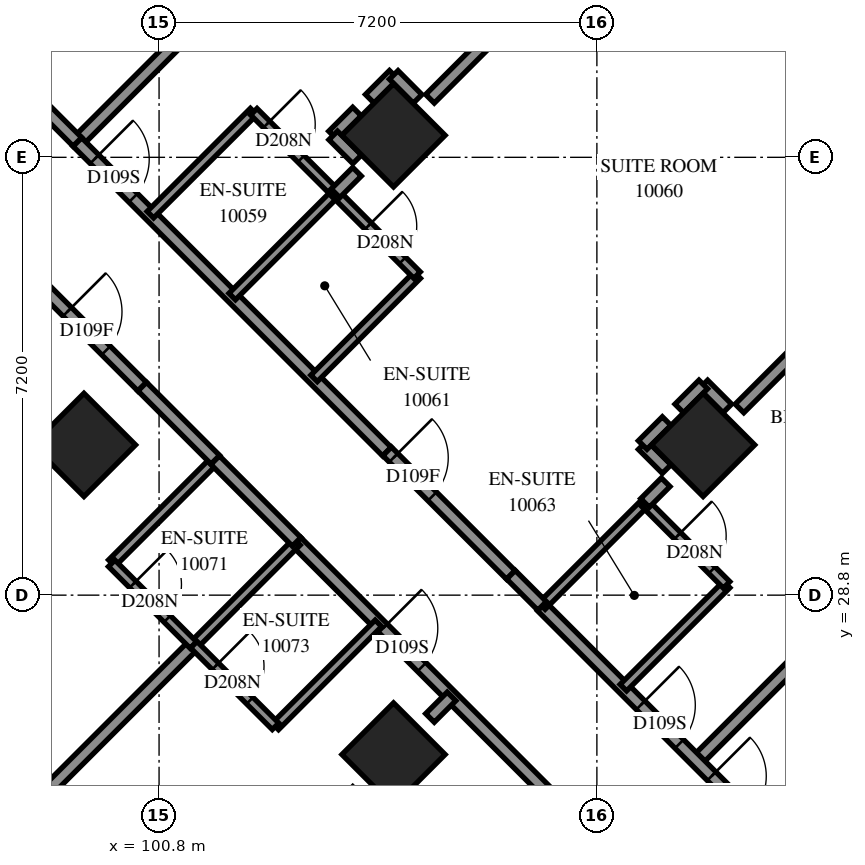
"""IFC4 building model, lengths in metres.
Left out: names, types, materials, properties, quantities, classifications, styles, units other than length and angle.
Written with IfcOpenShell. Run it as: python <this file> out.ifc"""

import sys

from ifc_helpers import new_model, si_unit, direction, frame, frame_2d, origin, origin_2d, place, context, subcontext, project, spatial, rectangle, extrude, element, fill, save


model = new_model("IFC4")
c1 = context("Model", 3, precision=1e-05, world=origin(), true_north=direction((0.0, 1.0)))
c2 = subcontext(c1, "Body", "Model", "MODEL_VIEW")
j1 = project(units=[si_unit("LENGTHUNIT", "METRE"), si_unit("PLANEANGLEUNIT", "RADIAN")], contexts=[c1])
p1 = place(None, origin())
s1 = spatial("IfcSite", under=j1, at=p1, CompositionType="ELEMENT")
p2 = place(p1, origin())
s2 = spatial("IfcBuilding", under=s1, at=p2, CompositionType="ELEMENT")
p3 = place(p2, frame((0.0, 0.0, 40.6)))
s3 = spatial("IfcBuildingStorey", under=s2, at=p3, CompositionType="ELEMENT", Elevation=40.6)
for number, where, z_axis, x_axis in (
    (1, (104.656, 36.362, 0.0), (0.0, 0.0, 1.0), (0.707, -0.707, 0.0)),
    (2, (99.565, 31.271, 0.0), (0.0, 0.0, 1.0), (0.707, -0.707, 0.0)),
    (3, (109.747, 31.271, 0.0), (0.0, 0.0, 1.0), (0.707, -0.707, 0.0)),
    (4, (104.656, 26.18, 0.0), (0.0, 0.0, 1.0), (0.707, -0.707, 0.0)),
):
    element("IfcColumn", number, at=place(p3, frame(where, z_axis=z_axis, x_axis=x_axis)), inside=s3, PredefinedType="COLUMN", context=c2, shape_type="SweptSolid", body=[
        extrude(rectangle(XDim=1.2, YDim=1.2, at=origin_2d()), origin(), (0.0, 0.0, 1.0), 3.1),
    ])
p4 = place(p3, frame((99.459, 36.255, 0.0), z_axis=(0.0, 0.0, 1.0), x_axis=(0.7071905616, 0.7070229908, 0.0)))
e5 = element("IfcWall", 5, at=p4, inside=s3, PredefinedType="PARTITIONING", context=c2, shape_type="SweptSolid", body=[
    extrude(rectangle(XDim=11.935, YDim=0.2, at=frame_2d((5.968, 0.0))), origin(), (0.0, 0.0, 1.0), 3.1),
])
p5 = place(p3, frame((103.061, 29.677, 0.0), z_axis=(0.0, 0.0, 1.0), x_axis=(0.7071067812, -0.7071067812, 0.0)))
e6 = element("IfcWall", 6, at=p5, inside=s3, PredefinedType="PARTITIONING", context=c2, shape_type="SweptSolid", body=[
    extrude(rectangle(XDim=10.802, YDim=0.2, at=frame_2d((5.401, 0.0))), origin(), (0.0, 0.0, 1.0), 3.1),
])
p6 = place(p5, frame((2.012, 0.0, 0.0)))
e7 = element("IfcOpeningElement", 7, at=p6, cuts=e6, PredefinedType="OPENING", context=c2, shape_type="SweptSolid", body=[
    extrude(rectangle(XDim=0.9, YDim=2.1, at=frame_2d((0.45, 1.05))), frame((0.0, 0.11, 0.0), z_axis=(0.0, -1.0, 0.0), x_axis=(1.0, 0.0, 0.0)), (0.0, 0.0, 1.0), 0.22),
])
p7 = place(p5, frame((7.463, 0.0, 0.0)))
e8 = element("IfcOpeningElement", 8, at=p7, cuts=e6, PredefinedType="OPENING", context=c2, shape_type="SweptSolid", body=[
    extrude(rectangle(XDim=1.0, YDim=2.1, at=frame_2d((0.5, 1.05))), frame((0.0, 0.11, 0.0), z_axis=(0.0, -1.0, 0.0), x_axis=(1.0, 0.0, 0.0)), (0.0, 0.0, 1.0), 0.22),
])
p8 = place(p3, frame((99.455, 36.253, 0.0), z_axis=(0.0, 0.0, 1.0), x_axis=(0.7071067812, -0.7071067812, 0.0)))
e9 = element("IfcWall", 9, at=p8, inside=s3, PredefinedType="PARTITIONING", context=c2, shape_type="SweptSolid", body=[
    extrude(rectangle(XDim=7.201, YDim=0.2, at=frame_2d((3.601, 0.0))), origin(), (0.0, 0.0, 1.0), 3.1),
])
p9 = place(p8, frame((0.401, 0.0, 0.0)))
e10 = element("IfcOpeningElement", 10, at=p9, cuts=e9, PredefinedType="OPENING", context=c2, shape_type="SweptSolid", body=[
    extrude(rectangle(XDim=0.9, YDim=2.1, at=frame_2d((0.45, 1.05))), frame((0.0, 0.11, 0.0), z_axis=(0.0, -1.0, 0.0), x_axis=(1.0, 0.0, 0.0)), (0.0, 0.0, 1.0), 0.22),
])
p10 = place(p3, frame((96.532, 23.148, 0.0), z_axis=(0.0, 0.0, 1.0), x_axis=(0.7071140939, 0.7070994684, 0.0)))
e11 = element("IfcWall", 11, at=p10, inside=s3, PredefinedType="PARTITIONING", context=c2, shape_type="SweptSolid", body=[
    extrude(rectangle(XDim=6.837, YDim=0.2, at=frame_2d((3.419, 0.0))), origin(), (0.0, 0.0, 1.0), 3.1),
])
p11 = place(p3, frame((109.64, 26.074, 0.0), z_axis=(0.0, 0.0, 1.0), x_axis=(0.7072538194, 0.7069597124, 0.0)))
e12 = element("IfcWall", 12, at=p11, inside=s3, PredefinedType="PARTITIONING", context=c2, shape_type="SweptSolid", body=[
    extrude(rectangle(XDim=6.8, YDim=0.2, at=frame_2d((3.4, 0.0))), origin(), (0.0, 0.0, 1.0), 3.1),
])
for number, where, z_axis, x_axis in (
    (13, (110.345, 31.871, 0.0), (0.0, 0.0, 1.0), (0.707, 0.707, 0.0)),
    (14, (105.255, 36.963, 0.0), (0.0, 0.0, 1.0), (0.707, 0.707, 0.0)),
):
    element("IfcWall", number, at=place(p3, frame(where, z_axis=z_axis, x_axis=x_axis)), inside=s3, PredefinedType="PARTITIONING", context=c2, shape_type="SweptSolid", body=[
        extrude(rectangle(XDim=5.504, YDim=0.2, at=frame_2d((2.752, 0.0))), origin(), (0.0, 0.0, 1.0), 3.1),
    ])
p12 = place(p3, frame((107.093, 28.615, 0.0), z_axis=(0.0, 0.0, 1.0), x_axis=(0.7072011313, -0.7070124185, 0.0)))
e15 = element("IfcWall", 15, at=p12, inside=s3, PredefinedType="PARTITIONING", context=c2, shape_type="SweptSolid", body=[
    extrude(rectangle(XDim=5.299, YDim=0.2, at=frame_2d((2.65, 0.0))), origin(), (0.0, 0.0, 1.0), 3.1),
])
p13 = place(p12, frame((2.299, 0.0, 0.0)))
e16 = element("IfcOpeningElement", 16, at=p13, cuts=e15, PredefinedType="OPENING", context=c2, shape_type="SweptSolid", body=[
    extrude(rectangle(XDim=0.9, YDim=2.1, at=frame_2d((0.45, 1.05))), frame((0.0, 0.11, 0.0), z_axis=(0.0, -1.0, 0.0), x_axis=(1.0, 0.0, 0.0)), (0.0, 0.0, 1.0), 0.22),
])
p14 = place(p12, frame((3.949, 0.0, 0.0)))
e17 = element("IfcOpeningElement", 17, at=p14, cuts=e15, PredefinedType="OPENING", context=c2, shape_type="SweptSolid", body=[
    extrude(rectangle(XDim=0.9, YDim=2.1, at=frame_2d((0.45, 1.05))), frame((0.0, 0.11, 0.0), z_axis=(0.0, -1.0, 0.0), x_axis=(1.0, 0.0, 0.0)), (0.0, 0.0, 1.0), 0.22),
])
p15 = place(p3, frame((96.913, 38.801, 0.0), z_axis=(0.0, 0.0, 1.0), x_axis=(0.7068288851, -0.7073845681, 0.0)))
e18 = element("IfcWall", 18, at=p15, inside=s3, PredefinedType="PARTITIONING", context=c2, shape_type="SweptSolid", body=[
    extrude(rectangle(XDim=3.599, YDim=0.2, at=frame_2d((1.8, 0.0))), origin(), (0.0, 0.0, 1.0), 3.1),
])
p16 = place(p3, frame((97.976, 34.772, 0.0), z_axis=(0.0, 0.0, 1.0), x_axis=(0.7073845681, -0.7068288851, 0.0)))
e19 = element("IfcWall", 19, at=p16, inside=s3, PredefinedType="PARTITIONING", context=c2, shape_type="SweptSolid", body=[
    extrude(rectangle(XDim=3.599, YDim=0.2, at=frame_2d((1.8, 0.0))), origin(), (0.0, 0.0, 1.0), 3.1),
])
p17 = place(p16, frame((1.858, 0.0, 0.0)))
e20 = element("IfcOpeningElement", 20, at=p17, cuts=e19, PredefinedType="OPENING", context=c2, shape_type="SweptSolid", body=[
    extrude(rectangle(XDim=0.9, YDim=2.1, at=frame_2d((0.45, 1.05))), frame((0.0, 0.11, 0.0), z_axis=(0.0, -1.0, 0.0), x_axis=(1.0, 0.0, 0.0)), (0.0, 0.0, 1.0), 0.22),
])
p18 = place(p3, frame((104.551, 31.165, 0.0), z_axis=(0.0, 0.0, 1.0), x_axis=(0.7074545101, -0.7067588812, 0.0)))
e21 = element("IfcWall", 21, at=p18, inside=s3, PredefinedType="PARTITIONING", context=c2, shape_type="SweptSolid", body=[
    extrude(rectangle(XDim=2.875, YDim=0.2, at=frame_2d((1.438, 0.0))), origin(), (0.0, 0.0, 1.0), 3.1),
])
p19 = place(p18, frame((0.148, 0.0, 0.0)))
e22 = element("IfcOpeningElement", 22, at=p19, cuts=e21, PredefinedType="OPENING", context=c2, shape_type="SweptSolid", body=[
    extrude(rectangle(XDim=0.9, YDim=2.1, at=frame_2d((0.45, 1.05))), frame((0.0, 0.11, 0.0), z_axis=(0.0, -1.0, 0.0), x_axis=(1.0, 0.0, 0.0)), (0.0, 0.0, 1.0), 0.22),
])
for number, where, z_axis, x_axis in (
    (23, (102.003, 33.711, 0.0), (0.0, 0.0, 1.0), (0.707, 0.707, 0.0)),
    (24, (100.023, 29.327, 0.0), (0.0, 0.0, 1.0), (0.707, 0.707, 0.0)),
):
    element("IfcWall", number, at=place(p3, frame(where, z_axis=z_axis, x_axis=x_axis)), inside=s3, PredefinedType="PARTITIONING", context=c2, shape_type="SweptSolid", body=[
        extrude(rectangle(XDim=2.401, YDim=0.15, at=frame_2d((1.201, 0.0))), origin(), (0.0, 0.0, 1.0), 3.1),
    ])
for number, where, z_axis, x_axis in (
    (25, (100.657, 35.057, 0.0), (0.0, 0.0, 1.0), (0.708, 0.707, 0.0)),
    (26, (101.371, 27.979, 0.0), (0.0, 0.0, 1.0), (0.707, 0.708, 0.0)),
    (27, (108.435, 27.279, 0.0), (0.0, 0.0, 1.0), (0.708, 0.707, 0.0)),
    (28, (103.349, 32.365, 0.0), (0.0, 0.0, 1.0), (0.707, 0.708, 0.0)),
):
    element("IfcWall", number, at=place(p3, frame(where, z_axis=z_axis, x_axis=x_axis)), inside=s3, PredefinedType="PARTITIONING", context=c2, shape_type="SweptSolid", body=[
        extrude(rectangle(XDim=2.4, YDim=0.15, at=frame_2d((1.2, 0.0))), origin(), (0.0, 0.0, 1.0), 3.1),
    ])
for number, where, z_axis, x_axis in (
    (29, (102.711, 26.641, 0.0), (0.0, 0.0, 1.0), (0.707, 0.707, 0.0)),
    (30, (107.095, 28.621, 0.0), (0.0, 0.0, 1.0), (0.707, 0.707, 0.0)),
    (31, (110.843, 24.873, 0.0), (0.0, 0.0, 1.0), (0.707, 0.707, 0.0)),
):
    element("IfcWall", number, at=place(p3, frame(where, z_axis=z_axis, x_axis=x_axis)), inside=s3, PredefinedType="PARTITIONING", context=c2, shape_type="SweptSolid", body=[
        extrude(rectangle(XDim=2.398, YDim=0.15, at=frame_2d((1.199, 0.0))), origin(), (0.0, 0.0, 1.0), 3.1),
    ])
p20 = place(p3, frame((100.021, 29.323, 0.0), z_axis=(0.0, 0.0, 1.0), x_axis=(0.7071067812, -0.7071067812, 0.0)))
e32 = element("IfcWall", 32, at=p20, inside=s3, PredefinedType="PARTITIONING", context=c2, shape_type="SweptSolid", body=[
    extrude(rectangle(XDim=1.901, YDim=0.15, at=frame_2d((0.95, 0.0))), origin(), (0.0, 0.0, 1.0), 3.1),
])
p21 = place(p20, frame((0.491, 0.0, 0.0)))
e33 = element("IfcOpeningElement", 33, at=p21, cuts=e32, PredefinedType="OPENING", context=c2, shape_type="SweptSolid", body=[
    extrude(rectangle(XDim=0.8, YDim=2.1, at=frame_2d((0.4, 1.05))), frame((0.0, 0.085, 0.0), z_axis=(0.0, -1.0, 0.0), x_axis=(1.0, 0.0, 0.0)), (0.0, 0.0, 1.0), 0.17),
])
p22 = place(p3, frame((108.789, 30.313, 0.0), z_axis=(0.0, 0.0, 1.0), x_axis=(0.7071067812, -0.7071067812, 0.0)))
e34 = element("IfcWall", 34, at=p22, inside=s3, PredefinedType="PARTITIONING", context=c2, shape_type="SweptSolid", body=[
    extrude(rectangle(XDim=1.901, YDim=0.15, at=frame_2d((0.95, 0.0))), origin(), (0.0, 0.0, 1.0), 3.1),
])
p23 = place(p22, frame((0.76, 0.0, 0.0)))
e35 = element("IfcOpeningElement", 35, at=p23, cuts=e34, PredefinedType="OPENING", context=c2, shape_type="SweptSolid", body=[
    extrude(rectangle(XDim=0.8, YDim=2.1, at=frame_2d((0.4, 1.05))), frame((0.0, 0.085, 0.0), z_axis=(0.0, -1.0, 0.0), x_axis=(1.0, 0.0, 0.0)), (0.0, 0.0, 1.0), 0.17),
])
p24 = place(p3, frame((101.371, 27.985, 0.0), z_axis=(0.0, 0.0, 1.0), x_axis=(0.7076330979, -0.7065800724, 0.0)))
e36 = element("IfcWall", 36, at=p24, inside=s3, PredefinedType="PARTITIONING", context=c2, shape_type="SweptSolid", body=[
    extrude(rectangle(XDim=1.899, YDim=0.15, at=frame_2d((0.95, 0.0))), origin(), (0.0, 0.0, 1.0), 3.1),
])
p25 = place(p24, frame((0.501, 0.0, 0.0)))
e37 = element("IfcOpeningElement", 37, at=p25, cuts=e36, PredefinedType="OPENING", context=c2, shape_type="SweptSolid", body=[
    extrude(rectangle(XDim=0.8, YDim=2.1, at=frame_2d((0.4, 1.05))), frame((0.0, 0.085, 0.0), z_axis=(0.0, -1.0, 0.0), x_axis=(1.0, 0.0, 0.0)), (0.0, 0.0, 1.0), 0.17),
])
p26 = place(p3, frame((103.701, 35.407, 0.0), z_axis=(0.0, 0.0, 1.0), x_axis=(0.7065800724, -0.7076330979, 0.0)))
e38 = element("IfcWall", 38, at=p26, inside=s3, PredefinedType="PARTITIONING", context=c2, shape_type="SweptSolid", body=[
    extrude(rectangle(XDim=1.899, YDim=0.15, at=frame_2d((0.95, 0.0))), origin(), (0.0, 0.0, 1.0), 3.1),
])
p27 = place(p26, frame((0.759, 0.0, 0.0)))
e39 = element("IfcOpeningElement", 39, at=p27, cuts=e38, PredefinedType="OPENING", context=c2, shape_type="SweptSolid", body=[
    extrude(rectangle(XDim=0.8, YDim=2.1, at=frame_2d((0.4, 1.05))), frame((0.0, 0.085, 0.0), z_axis=(0.0, -1.0, 0.0), x_axis=(1.0, 0.0, 0.0)), (0.0, 0.0, 1.0), 0.17),
])
p28 = place(p3, frame((101.72, 31.022, 0.0), z_axis=(0.0, 0.0, 1.0), x_axis=(0.7065800724, -0.7076330979, 0.0)))
e40 = element("IfcWall", 40, at=p28, inside=s3, PredefinedType="PARTITIONING", context=c2, shape_type="SweptSolid", body=[
    extrude(rectangle(XDim=1.899, YDim=0.2, at=frame_2d((0.95, 0.0))), origin(), (0.0, 0.0, 1.0), 3.1),
])
p29 = place(p3, frame((102.358, 36.75, 0.0), z_axis=(0.0, 0.0, 1.0), x_axis=(0.7076330979, -0.7065800724, 0.0)))
e41 = element("IfcWall", 41, at=p29, inside=s3, PredefinedType="PARTITIONING", context=c2, shape_type="SweptSolid", body=[
    extrude(rectangle(XDim=1.899, YDim=0.15, at=frame_2d((0.95, 0.0))), origin(), (0.0, 0.0, 1.0), 3.1),
])
p30 = place(p29, frame((0.296, 0.0, 0.0)))
e42 = element("IfcOpeningElement", 42, at=p30, cuts=e41, PredefinedType="OPENING", context=c2, shape_type="SweptSolid", body=[
    extrude(rectangle(XDim=0.8, YDim=2.1, at=frame_2d((0.4, 1.05))), frame((0.0, 0.085, 0.0), z_axis=(0.0, -1.0, 0.0), x_axis=(1.0, 0.0, 0.0)), (0.0, 0.0, 1.0), 0.17),
])
p31 = place(p3, frame((100.523, 32.229, 0.0), z_axis=(0.0, 0.0, 1.0), x_axis=(0.7071067812, -0.7071067812, 0.0)))
e43 = element("IfcWall", 43, at=p31, inside=s3, PredefinedType="PARTITIONING", context=c2, shape_type="SweptSolid", body=[
    extrude(rectangle(XDim=1.7, YDim=0.2, at=frame_2d((0.85, 0.0))), origin(), (0.0, 0.0, 1.0), 3.1),
])
p32 = place(p3, frame((106.587, 29.135, 0.0), z_axis=(0.0, 0.0, 1.0), x_axis=(0.7071067812, -0.7071067812, 0.0)))
e44 = element("IfcWall", 44, at=p32, inside=s3, PredefinedType="PARTITIONING", context=c2, shape_type="SweptSolid", body=[
    extrude(rectangle(XDim=0.724, YDim=0.2, at=frame_2d((0.362, 0.0))), origin(), (0.0, 0.0, 1.0), 3.1),
])
for number, where, z_axis, x_axis in (
    (45, (108.754, 31.268, 0.0), (0.0, 0.0, 1.0), (0.707, -0.707, 0.0)),
    (46, (109.751, 32.265, 0.0), (0.0, 0.0, 1.0), (0.707, -0.707, 0.0)),
    (47, (109.355, 31.871, 0.0), (0.0, 0.0, 1.0), (0.707, 0.707, 0.0)),
    (48, (108.753, 31.269, 0.0), (0.0, 0.0, 1.0), (0.707, 0.707, 0.0)),
    (49, (103.661, 36.359, 0.0), (0.0, 0.0, 1.0), (0.707, 0.707, 0.0)),
    (50, (104.265, 36.963, 0.0), (0.0, 0.0, 1.0), (0.707, 0.707, 0.0)),
):
    element("IfcWall", number, at=place(p3, frame(where, z_axis=z_axis, x_axis=x_axis)), inside=s3, PredefinedType="PARTITIONING", context=c2, shape_type="SweptSolid", body=[
        extrude(rectangle(XDim=0.557, YDim=0.2, at=frame_2d((0.279, 0.0))), origin(), (0.0, 0.0, 1.0), 3.1),
    ])
for number, where, z_axis, x_axis in (
    (51, (104.659, 37.355, 0.0), (0.0, 0.0, 1.0), (0.705, -0.709, 0.0)),
    (52, (103.664, 36.36, 0.0), (0.0, 0.0, 1.0), (0.709, -0.705, 0.0)),
):
    element("IfcWall", number, at=place(p3, frame(where, z_axis=z_axis, x_axis=x_axis)), inside=s3, PredefinedType="PARTITIONING", context=c2, shape_type="SweptSolid", body=[
        extrude(rectangle(XDim=0.556, YDim=0.2, at=frame_2d((0.278, 0.0))), origin(), (0.0, 0.0, 1.0), 3.1),
    ])
for number, where, z_axis, x_axis in (
    (53, (105.255, 26.781, 0.0), (0.0, 0.0, 1.0), (0.707, 0.707, 0.0)),
    (54, (103.701, 35.409, 0.0), (0.0, 0.0, 1.0), (0.707, 0.707, 0.0)),
):
    element("IfcWall", number, at=place(p3, frame(where, z_axis=z_axis, x_axis=x_axis)), inside=s3, PredefinedType="PARTITIONING", context=c2, shape_type="SweptSolid", body=[
        extrude(rectangle(XDim=0.501, YDim=0.2, at=frame_2d((0.25, 0.0))), origin(), (0.0, 0.0, 1.0), 3.1),
    ])
p33 = place(p3, frame((108.791, 30.317, 0.0), z_axis=(0.0, 0.0, 1.0), x_axis=(0.7071067812, 0.7071067812, 0.0)))
e55 = element("IfcWall", 55, at=p33, inside=s3, PredefinedType="PARTITIONING", context=c2, shape_type="SweptSolid", body=[
    extrude(rectangle(XDim=0.481, YDim=0.2, at=frame_2d((0.24, 0.0))), origin(), (0.0, 0.0, 1.0), 3.1),
])
p34 = place(p9, origin())
e56 = element("IfcDoor", 56, at=p34, inside=s3, OperationType="SINGLE_SWING_RIGHT", PredefinedType="DOOR", context=c2, shape_type="SweptSolid", body=[
    extrude(rectangle(XDim=0.9, YDim=2.1, at=frame_2d((0.45, 1.05))), frame((0.0, 0.025, 0.0), z_axis=(0.0, -1.0, 0.0), x_axis=(1.0, 0.0, 0.0)), (0.0, 0.0, 1.0), 0.05),
])
fill(e10, e56)
p35 = place(p30, origin())
e57 = element("IfcDoor", 57, at=p35, inside=s3, OperationType="SINGLE_SWING_RIGHT", PredefinedType="DOOR", context=c2, shape_type="SweptSolid", body=[
    extrude(rectangle(XDim=0.8, YDim=2.1, at=frame_2d((0.4, 1.05))), frame((0.0, 0.025, 0.0), z_axis=(0.0, -1.0, 0.0), x_axis=(1.0, 0.0, 0.0)), (0.0, 0.0, 1.0), 0.05),
])
fill(e42, e57)
p36 = place(p19, origin())
e58 = element("IfcDoor", 58, at=p36, inside=s3, OperationType="SINGLE_SWING_LEFT", PredefinedType="DOOR", context=c2, shape_type="SweptSolid", body=[
    extrude(rectangle(XDim=0.9, YDim=2.1, at=frame_2d((0.45, 1.05))), frame((0.0, 0.025, 0.0), z_axis=(0.0, -1.0, 0.0), x_axis=(1.0, 0.0, 0.0)), (0.0, 0.0, 1.0), 0.05),
])
fill(e22, e58)
p37 = place(p27, origin())
e59 = element("IfcDoor", 59, at=p37, inside=s3, OperationType="SINGLE_SWING_RIGHT", PredefinedType="DOOR", context=c2, shape_type="SweptSolid", body=[
    extrude(rectangle(XDim=0.8, YDim=2.1, at=frame_2d((0.4, 1.05))), frame((0.0, 0.025, 0.0), z_axis=(0.0, -1.0, 0.0), x_axis=(1.0, 0.0, 0.0)), (0.0, 0.0, 1.0), 0.05),
])
fill(e39, e59)
p38 = place(p13, origin())
e60 = element("IfcDoor", 60, at=p38, inside=s3, OperationType="SINGLE_SWING_LEFT", PredefinedType="DOOR", context=c2, shape_type="SweptSolid", body=[
    extrude(rectangle(XDim=0.9, YDim=2.1, at=frame_2d((0.45, 1.05))), frame((0.0, 0.025, 0.0), z_axis=(0.0, -1.0, 0.0), x_axis=(1.0, 0.0, 0.0)), (0.0, 0.0, 1.0), 0.05),
])
fill(e16, e60)
p39 = place(p23, origin())
e61 = element("IfcDoor", 61, at=p39, inside=s3, OperationType="SINGLE_SWING_RIGHT", PredefinedType="DOOR", context=c2, shape_type="SweptSolid", body=[
    extrude(rectangle(XDim=0.8, YDim=2.1, at=frame_2d((0.4, 1.05))), frame((0.0, 0.025, 0.0), z_axis=(0.0, -1.0, 0.0), x_axis=(1.0, 0.0, 0.0)), (0.0, 0.0, 1.0), 0.05),
])
fill(e35, e61)
p40 = place(p17, origin())
e62 = element("IfcDoor", 62, at=p40, inside=s3, OperationType="SINGLE_SWING_LEFT", PredefinedType="DOOR", context=c2, shape_type="SweptSolid", body=[
    extrude(rectangle(XDim=0.9, YDim=2.1, at=frame_2d((0.45, 1.05))), frame((0.0, 0.025, 0.0), z_axis=(0.0, -1.0, 0.0), x_axis=(1.0, 0.0, 0.0)), (0.0, 0.0, 1.0), 0.05),
])
fill(e20, e62)
p41 = place(p21, origin())
e63 = element("IfcDoor", 63, at=p41, inside=s3, OperationType="SINGLE_SWING_RIGHT", PredefinedType="DOOR", context=c2, shape_type="SweptSolid", body=[
    extrude(rectangle(XDim=0.8, YDim=2.1, at=frame_2d((0.4, 1.05))), frame((0.0, 0.025, 0.0), z_axis=(0.0, -1.0, 0.0), x_axis=(1.0, 0.0, 0.0)), (0.0, 0.0, 1.0), 0.05),
])
fill(e33, e63)
p42 = place(p6, origin())
e64 = element("IfcDoor", 64, at=p42, inside=s3, OperationType="SINGLE_SWING_LEFT", PredefinedType="DOOR", context=c2, shape_type="SweptSolid", body=[
    extrude(rectangle(XDim=0.9, YDim=2.1, at=frame_2d((0.45, 1.05))), frame((0.0, 0.025, 0.0), z_axis=(0.0, -1.0, 0.0), x_axis=(1.0, 0.0, 0.0)), (0.0, 0.0, 1.0), 0.05),
])
fill(e7, e64)
p43 = place(p25, origin())
e65 = element("IfcDoor", 65, at=p43, inside=s3, OperationType="SINGLE_SWING_RIGHT", PredefinedType="DOOR", context=c2, shape_type="SweptSolid", body=[
    extrude(rectangle(XDim=0.8, YDim=2.1, at=frame_2d((0.4, 1.05))), frame((0.0, 0.025, 0.0), z_axis=(0.0, -1.0, 0.0), x_axis=(1.0, 0.0, 0.0)), (0.0, 0.0, 1.0), 0.05),
])
fill(e37, e65)
p44 = place(p14, origin())
e66 = element("IfcDoor", 66, at=p44, inside=s3, OperationType="SINGLE_SWING_RIGHT", PredefinedType="DOOR", context=c2, shape_type="SweptSolid", body=[
    extrude(rectangle(XDim=0.9, YDim=2.1, at=frame_2d((0.45, 1.05))), frame((0.0, 0.025, 0.0), z_axis=(0.0, -1.0, 0.0), x_axis=(1.0, 0.0, 0.0)), (0.0, 0.0, 1.0), 0.05),
])
fill(e17, e66)
save(model, sys.argv[1])
